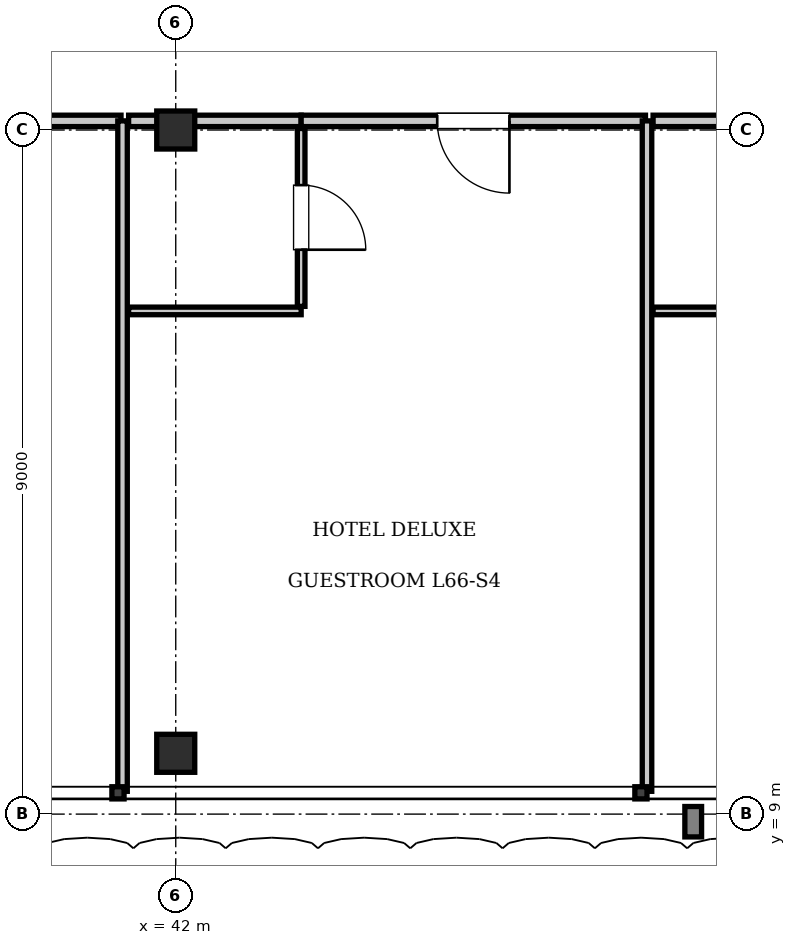
"""IFC4 building model, lengths in metres.
Left out: names, types, materials, properties, quantities, classifications, styles, units other than length and angle.
Written with IfcOpenShell. Run it as: python <this file> out.ifc"""

import sys

from ifc_helpers import new_model, si_unit, direction, frame, frame_2d, origin, origin_2d, place, context, subcontext, project, spatial, rectangle, i_section, extrude, element, fill, save


model = new_model("IFC4")
c1 = context("Model", 3, precision=1e-05, world=origin(), true_north=direction((0.0, 1.0)))
c2 = subcontext(c1, "Body", "Model", "MODEL_VIEW")
j1 = project(units=[si_unit("LENGTHUNIT", "METRE"), si_unit("PLANEANGLEUNIT", "RADIAN")], contexts=[c1])
p1 = place(None, origin())
s1 = spatial("IfcSite", under=j1, at=p1, CompositionType="ELEMENT")
p2 = place(p1, origin())
s2 = spatial("IfcBuilding", under=s1, at=p2, CompositionType="ELEMENT")
p3 = place(p2, frame((0.0, 0.0, 270.2)))
s3 = spatial("IfcBuildingStorey", under=s2, at=p3, CompositionType="ELEMENT", Elevation=270.2)
for number, where, z_axis, x_axis in (
    (1, (42.0, 18.0, 0.0), (0.0, 0.0, 1.0), (1.0, 0.0, 0.0)),
    (2, (42.0, 9.8, 0.0), (0.0, 0.0, 1.0), (1.0, 0.0, 0.0)),
):
    element("IfcColumn", number, at=place(p3, frame(where, z_axis=z_axis, x_axis=x_axis)), inside=s3, PredefinedType="COLUMN", context=c2, shape_type="SweptSolid", body=[
        extrude(i_section(OverallWidth=0.5, OverallDepth=0.5, WebThickness=0.022, FlangeThickness=0.032, at=origin_2d()), origin(), (0.0, 0.0, 1.0), 3.85),
    ])
p4 = place(p3, frame((36.65, 18.12, 0.0), z_axis=(0.0, 0.0, 1.0), x_axis=(1.0, 0.0, 0.0)))
e3 = element("IfcWall", 3, at=p4, inside=s3, PredefinedType="PARTITIONING", context=c2, shape_type="SweptSolid", body=[
    extrude(rectangle(XDim=4.63, YDim=0.15, at=frame_2d((2.315, 0.0))), origin(), (0.0, 0.0, 1.0), 3.077),
])
p5 = place(p4, frame((1.84, 0.0, 0.0)))
e4 = element("IfcOpeningElement", 4, at=p5, cuts=e3, PredefinedType="OPENING", context=c2, shape_type="SweptSolid", body=[
    extrude(rectangle(XDim=0.95, YDim=2.15, at=frame_2d((0.475, 1.075))), frame((0.0, 0.085, 0.0), z_axis=(0.0, -1.0, 0.0), x_axis=(1.0, 0.0, 0.0)), (0.0, 0.0, 1.0), 0.17),
])
p6 = place(p3, frame((41.3, 9.3, 0.0), z_axis=(0.0, 0.0, 1.0), x_axis=(0.0, 1.0, 0.0)))
e5 = element("IfcWall", 5, at=p6, inside=s3, PredefinedType="PARTITIONING", context=c2, shape_type="SweptSolid", body=[
    extrude(rectangle(XDim=8.82, YDim=0.125, at=frame_2d((4.41, 0.0))), origin(), (0.0, 0.0, 1.0), 3.61),
])
p7 = place(p3, frame((41.38, 18.12, 0.0), z_axis=(0.0, 0.0, 1.0), x_axis=(1.0, 0.0, 0.0)))
e6 = element("IfcWall", 6, at=p7, inside=s3, PredefinedType="PARTITIONING", context=c2, shape_type="SweptSolid", body=[
    extrude(rectangle(XDim=2.27, YDim=0.15, at=frame_2d((1.135, 0.0))), origin(), (0.0, 0.0, 1.0), 3.077),
])
p8 = place(p3, frame((41.38, 15.62, 0.0), z_axis=(0.0, 0.0, 1.0), x_axis=(1.0, 0.0, 0.0)))
e7 = element("IfcWall", 7, at=p8, inside=s3, PredefinedType="PARTITIONING", context=c2, shape_type="SweptSolid", body=[
    extrude(rectangle(XDim=2.27, YDim=0.1, at=frame_2d((1.135, 0.0))), origin(), (0.0, 0.0, 1.0), 3.61),
])
p9 = place(p3, frame((43.65, 15.68, 0.0), z_axis=(0.0, 0.0, 1.0), x_axis=(0.0, 1.0, 0.0)))
e8 = element("IfcWall", 8, at=p9, inside=s3, PredefinedType="PARTITIONING", context=c2, shape_type="SweptSolid", body=[
    extrude(rectangle(XDim=2.34, YDim=0.1, at=frame_2d((1.17, 0.0))), origin(), (0.0, 0.0, 1.0), 3.61),
])
p10 = place(p9, frame((0.745, 0.0, 0.0)))
e9 = element("IfcOpeningElement", 9, at=p10, cuts=e8, PredefinedType="OPENING", context=c2, shape_type="SweptSolid", body=[
    extrude(rectangle(XDim=0.85, YDim=2.1, at=frame_2d((0.425, 1.05))), frame((0.0, 0.06, 0.0), z_axis=(0.0, -1.0, 0.0), x_axis=(1.0, 0.0, 0.0)), (0.0, 0.0, 1.0), 0.12),
])
p11 = place(p3, frame((43.65, 18.12, 0.0), z_axis=(0.0, 0.0, 1.0), x_axis=(1.0, 0.0, 0.0)))
e10 = element("IfcWall", 10, at=p11, inside=s3, PredefinedType="PARTITIONING", context=c2, shape_type="SweptSolid", body=[
    extrude(rectangle(XDim=4.53, YDim=0.15, at=frame_2d((2.265, 0.0))), origin(), (0.0, 0.0, 1.0), 3.077),
])
p12 = place(p11, frame((1.79, 0.0, 0.0)))
e11 = element("IfcOpeningElement", 11, at=p12, cuts=e10, PredefinedType="OPENING", context=c2, shape_type="SweptSolid", body=[
    extrude(rectangle(XDim=0.95, YDim=2.15, at=frame_2d((0.475, 1.075))), frame((0.0, 0.085, 0.0), z_axis=(0.0, -1.0, 0.0), x_axis=(1.0, 0.0, 0.0)), (0.0, 0.0, 1.0), 0.17),
])
p13 = place(p3, frame((48.2, 9.3, 0.0), z_axis=(0.0, 0.0, 1.0), x_axis=(0.0, 1.0, 0.0)))
e12 = element("IfcWall", 12, at=p13, inside=s3, PredefinedType="PARTITIONING", context=c2, shape_type="SweptSolid", body=[
    extrude(rectangle(XDim=8.82, YDim=0.125, at=frame_2d((4.41, 0.0))), origin(), (0.0, 0.0, 1.0), 3.61),
])
p14 = place(p3, frame((48.28, 18.12, 0.0), z_axis=(0.0, 0.0, 1.0), x_axis=(1.0, 0.0, 0.0)))
e13 = element("IfcWall", 13, at=p14, inside=s3, PredefinedType="PARTITIONING", context=c2, shape_type="SweptSolid", body=[
    extrude(rectangle(XDim=2.27, YDim=0.15, at=frame_2d((1.135, 0.0))), origin(), (0.0, 0.0, 1.0), 3.077),
])
p15 = place(p3, frame((48.28, 15.62, 0.0), z_axis=(0.0, 0.0, 1.0), x_axis=(1.0, 0.0, 0.0)))
e14 = element("IfcWall", 14, at=p15, inside=s3, PredefinedType="PARTITIONING", context=c2, shape_type="SweptSolid", body=[
    extrude(rectangle(XDim=2.27, YDim=0.1, at=frame_2d((1.135, 0.0))), origin(), (0.0, 0.0, 1.0), 3.61),
])
p16 = place(p10, frame((0.85, 0.0, 0.0), z_axis=(0.0, 0.0, 1.0), x_axis=(-1.0, 0.0, 0.0)))
e15 = element("IfcDoor", 15, at=p16, inside=s3, OperationType="SINGLE_SWING_RIGHT", PredefinedType="DOOR", context=c2, shape_type="SweptSolid", body=[
    extrude(rectangle(XDim=0.85, YDim=2.1, at=frame_2d((0.425, 1.05))), frame((0.0, 0.025, 0.0), z_axis=(0.0, -1.0, 0.0), x_axis=(1.0, 0.0, 0.0)), (0.0, 0.0, 1.0), 0.05),
])
fill(e9, e15)
p17 = place(p12, frame((0.95, 0.0, 0.0), z_axis=(0.0, 0.0, 1.0), x_axis=(-1.0, 0.0, 0.0)))
e16 = element("IfcDoor", 16, at=p17, inside=s3, OperationType="SINGLE_SWING_LEFT", PredefinedType="DOOR", context=c2, shape_type="SweptSolid", body=[
    extrude(rectangle(XDim=0.95, YDim=2.15, at=frame_2d((0.475, 1.075))), frame((0.0, 0.025, 0.0), z_axis=(0.0, -1.0, 0.0), x_axis=(1.0, 0.0, 0.0)), (0.0, 0.0, 1.0), 0.05),
])
fill(e11, e16)
save(model, sys.argv[1])
